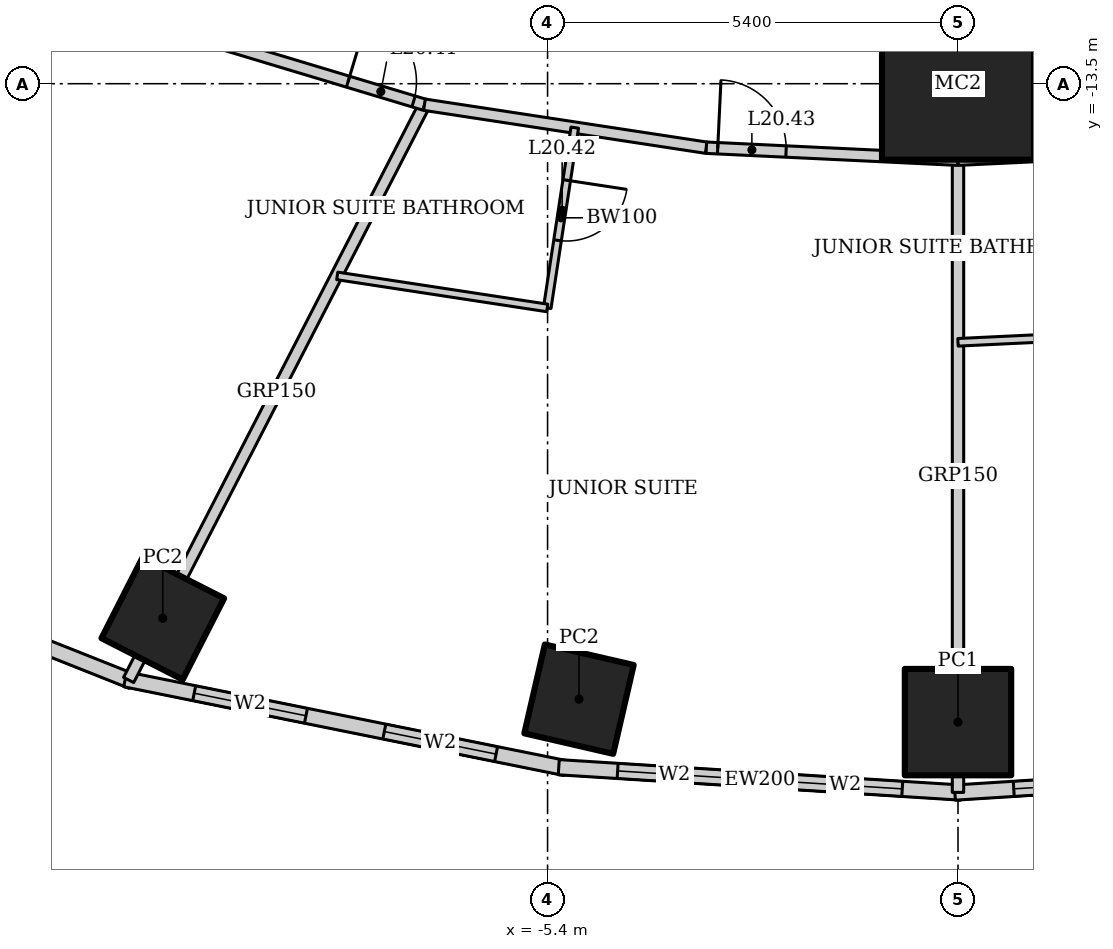
"""IFC4 building model, lengths in metres.
Left out: names, types, materials, properties, quantities, classifications, styles, units other than length and angle.
Written with IfcOpenShell. Run it as: python <this file> out.ifc"""

import sys

from ifc_helpers import new_model, si_unit, direction, frame, frame_2d, origin, origin_2d, place, context, subcontext, project, spatial, rectangle, hollow_rectangle, extrude, element, fill, save


model = new_model("IFC4")
c1 = context("Model", 3, precision=1e-05, world=origin(), true_north=direction((0.0, 1.0)))
c2 = subcontext(c1, "Body", "Model", "MODEL_VIEW")
j1 = project(units=[si_unit("LENGTHUNIT", "METRE"), si_unit("PLANEANGLEUNIT", "RADIAN")], contexts=[c1])
p1 = place(None, origin())
s1 = spatial("IfcSite", under=j1, at=p1, CompositionType="ELEMENT")
p2 = place(p1, origin())
s2 = spatial("IfcBuilding", under=s1, at=p2, CompositionType="ELEMENT")
p3 = place(p2, frame((0.0, 0.0, 87.4)))
s3 = spatial("IfcBuildingStorey", under=s2, at=p3, CompositionType="ELEMENT", Elevation=87.4)
p4 = place(p3, frame((0.0, -13.5, 0.0), z_axis=(0.0, 0.0, 1.0), x_axis=(1.0, 0.0, 0.0)))
e1 = element("IfcColumn", 1, at=p4, inside=s3, PredefinedType="COLUMN", context=c2, shape_type="SweptSolid", body=[
    extrude(hollow_rectangle(XDim=2.0, YDim=2.0, WallThickness=0.17, at=origin_2d()), origin(), (0.0, 0.0, 1.0), 3.6),
])
for number, where, z_axis, x_axis in (
    (2, (-10.463, -20.534, 0.0), (0.0, 0.0, 1.0), (0.454, 0.891, 0.0)),
    (3, (-4.986, -21.598, 0.0), (0.0, 0.0, 1.0), (0.225, 0.974, 0.0)),
):
    element("IfcColumn", number, at=place(p3, frame(where, z_axis=z_axis, x_axis=x_axis)), inside=s3, PredefinedType="COLUMN", context=c2, shape_type="SweptSolid", body=[
        extrude(hollow_rectangle(XDim=1.2, YDim=1.2, WallThickness=0.1, at=origin_2d()), origin(), (0.0, 0.0, 1.0), 3.6),
    ])
p5 = place(p3, frame((0.0, -21.9, 0.0), z_axis=(0.0, 0.0, 1.0), x_axis=(1.0, 0.0, 0.0)))
e4 = element("IfcColumn", 4, at=p5, inside=s3, PredefinedType="COLUMN", context=c2, shape_type="SweptSolid", body=[
    extrude(hollow_rectangle(XDim=1.4, YDim=1.4, WallThickness=0.1, at=origin_2d()), origin(), (0.0, 0.0, 1.0), 3.6),
])
p6 = place(p3, frame((-18.018, -18.523, 0.0), z_axis=(0.0, 0.0, 1.0), x_axis=(0.929358351251, -0.369178892895, 0.0)))
e5 = element("IfcWall", 5, at=p6, inside=s3, PredefinedType="SOLIDWALL", context=c2, shape_type="SweptSolid", body=[
    extrude(rectangle(XDim=7.692, YDim=0.2, at=frame_2d((3.846, 0.0))), origin(), (0.0, 0.0, 1.0), 3.45),
])
p7 = place(p6, frame((1.373, 0.0, 0.5)))
e6 = element("IfcOpeningElement", 6, at=p7, cuts=e5, PredefinedType="OPENING", context=c2, shape_type="SweptSolid", body=[
    extrude(rectangle(XDim=1.5, YDim=2.2, at=frame_2d((0.75, 1.1))), frame((0.0, 0.11, 0.0), z_axis=(0.0, -1.0, 0.0), x_axis=(1.0, 0.0, 0.0)), (0.0, 0.0, 1.0), 0.22),
])
p8 = place(p6, frame((4.819, 0.0, 0.5)))
e7 = element("IfcOpeningElement", 7, at=p8, cuts=e5, PredefinedType="OPENING", context=c2, shape_type="SweptSolid", body=[
    extrude(rectangle(XDim=1.5, YDim=2.2, at=frame_2d((0.75, 1.1))), frame((0.0, 0.11, 0.0), z_axis=(0.0, -1.0, 0.0), x_axis=(1.0, 0.0, 0.0)), (0.0, 0.0, 1.0), 0.22),
])
p9 = place(p3, frame((-10.957, -21.337, 0.0), z_axis=(0.0, 0.0, 1.0), x_axis=(0.980251657452, -0.197754110105, 0.0)))
e8 = element("IfcWall", 8, at=p9, inside=s3, PredefinedType="SOLIDWALL", context=c2, shape_type="SweptSolid", body=[
    extrude(rectangle(XDim=5.904, YDim=0.2, at=frame_2d((2.952, 0.0))), origin(), (0.0, 0.0, 1.0), 3.45),
])
p10 = place(p9, frame((0.926, 0.0, 0.5)))
e9 = element("IfcOpeningElement", 9, at=p10, cuts=e8, PredefinedType="OPENING", context=c2, shape_type="SweptSolid", body=[
    extrude(rectangle(XDim=1.5, YDim=2.2, at=frame_2d((0.75, 1.1))), frame((0.0, 0.11, 0.0), z_axis=(0.0, -1.0, 0.0), x_axis=(1.0, 0.0, 0.0)), (0.0, 0.0, 1.0), 0.22),
])
p11 = place(p9, frame((3.478, 0.0, 0.5)))
e10 = element("IfcOpeningElement", 10, at=p11, cuts=e8, PredefinedType="OPENING", context=c2, shape_type="SweptSolid", body=[
    extrude(rectangle(XDim=1.5, YDim=2.2, at=frame_2d((0.75, 1.1))), frame((0.0, 0.11, 0.0), z_axis=(0.0, -1.0, 0.0), x_axis=(1.0, 0.0, 0.0)), (0.0, 0.0, 1.0), 0.22),
])
p12 = place(p3, frame((-5.253, -22.493, 0.0), z_axis=(0.0, 0.0, 1.0), x_axis=(0.998018582375, -0.062919863585, 0.0)))
e11 = element("IfcWall", 11, at=p12, inside=s3, PredefinedType="SOLIDWALL", context=c2, shape_type="SweptSolid", body=[
    extrude(rectangle(XDim=5.304, YDim=0.2, at=frame_2d((2.652, 0.0))), origin(), (0.0, 0.0, 1.0), 3.45),
])
p13 = place(p12, frame((0.776, 0.0, 0.5)))
e12 = element("IfcOpeningElement", 12, at=p13, cuts=e11, PredefinedType="OPENING", context=c2, shape_type="SweptSolid", body=[
    extrude(rectangle(XDim=1.5, YDim=2.2, at=frame_2d((0.75, 1.1))), frame((0.0, 0.11, 0.0), z_axis=(0.0, -1.0, 0.0), x_axis=(1.0, 0.0, 0.0)), (0.0, 0.0, 1.0), 0.22),
])
p14 = place(p12, frame((3.028, 0.0, 0.5)))
e13 = element("IfcOpeningElement", 13, at=p14, cuts=e11, PredefinedType="OPENING", context=c2, shape_type="SweptSolid", body=[
    extrude(rectangle(XDim=1.5, YDim=2.2, at=frame_2d((0.75, 1.1))), frame((0.0, 0.11, 0.0), z_axis=(0.0, -1.0, 0.0), x_axis=(1.0, 0.0, 0.0)), (0.0, 0.0, 1.0), 0.22),
])
p15 = place(p3, frame((-0.041, -22.827, 0.0), z_axis=(0.0, 0.0, 1.0), x_axis=(0.998018582375, 0.062919863585, 0.0)))
e14 = element("IfcWall", 14, at=p15, inside=s3, PredefinedType="SOLIDWALL", context=c2, shape_type="SweptSolid", body=[
    extrude(rectangle(XDim=5.304, YDim=0.2, at=frame_2d((2.652, 0.0))), origin(), (0.0, 0.0, 1.0), 3.45),
])
p16 = place(p15, frame((0.776, 0.0, 0.5)))
e15 = element("IfcOpeningElement", 15, at=p16, cuts=e14, PredefinedType="OPENING", context=c2, shape_type="SweptSolid", body=[
    extrude(rectangle(XDim=1.5, YDim=2.2, at=frame_2d((0.75, 1.1))), frame((0.0, 0.11, 0.0), z_axis=(0.0, -1.0, 0.0), x_axis=(1.0, 0.0, 0.0)), (0.0, 0.0, 1.0), 0.22),
])
p17 = place(p15, frame((3.028, 0.0, 0.5)))
e16 = element("IfcOpeningElement", 16, at=p17, cuts=e14, PredefinedType="OPENING", context=c2, shape_type="SweptSolid", body=[
    extrude(rectangle(XDim=1.5, YDim=2.2, at=frame_2d((0.75, 1.1))), frame((0.0, 0.11, 0.0), z_axis=(0.0, -1.0, 0.0), x_axis=(1.0, 0.0, 0.0)), (0.0, 0.0, 1.0), 0.22),
])
p18 = place(p3, frame((-10.912, -21.346, 0.0), z_axis=(0.0, 0.0, 1.0), x_axis=(0.457327273085, 0.889298468059, 0.0)))
e17 = element("IfcWall", 17, at=p18, inside=s3, PredefinedType="PARTITIONING", context=c2, shape_type="SweptSolid", body=[
    extrude(rectangle(XDim=8.511, YDim=0.15, at=frame_2d((4.256, 0.0))), origin(), (0.0, 0.0, 1.0), 2.528),
])
p19 = place(p3, frame((0.0, -22.825, 0.0), z_axis=(0.0, 0.0, 1.0), x_axis=(0.0, 1.0, 0.0)))
e18 = element("IfcWall", 18, at=p19, inside=s3, PredefinedType="PARTITIONING", context=c2, shape_type="SweptSolid", body=[
    extrude(rectangle(XDim=8.325, YDim=0.15, at=frame_2d((4.162, 0.0))), origin(), (0.0, 0.0, 1.0), 2.924),
])
p20 = place(p3, frame((-11.888, -12.311, 0.0), z_axis=(0.0, 0.0, 1.0), x_axis=(0.957564241242, -0.288219922793, 0.0)))
e19 = element("IfcWall", 19, at=p20, inside=s3, PredefinedType="PARTITIONING", context=c2, shape_type="SweptSolid", body=[
    extrude(rectangle(XDim=5.085, YDim=0.15, at=frame_2d((2.542, 0.0))), origin(), (0.0, 0.0, 1.0), 3.45),
])
p21 = place(p20, frame((4.035, 0.0, 0.0)))
e20 = element("IfcOpeningElement", 20, at=p21, cuts=e19, PredefinedType="OPENING", context=c2, shape_type="SweptSolid", body=[
    extrude(rectangle(XDim=0.9, YDim=2.1, at=frame_2d((0.45, 1.05))), frame((0.0, 0.085, 0.0), z_axis=(0.0, -1.0, 0.0), x_axis=(1.0, 0.0, 0.0)), (0.0, 0.0, 1.0), 0.17),
])
p22 = place(p3, frame((-7.019, -13.776, 0.0), z_axis=(0.0, 0.0, 1.0), x_axis=(0.988564270062, -0.150800145746, 0.0)))
e21 = element("IfcWall", 21, at=p22, inside=s3, PredefinedType="PARTITIONING", context=c2, shape_type="SweptSolid", body=[
    extrude(rectangle(XDim=3.751, YDim=0.15, at=frame_2d((1.875, 0.0))), origin(), (0.0, 0.0, 1.0), 3.45),
])
p23 = place(p3, frame((-3.311, -14.342, 0.0), z_axis=(0.0, 0.0, 1.0), x_axis=(0.998863968075, -0.047652631422, 0.0)))
e22 = element("IfcWall", 22, at=p23, inside=s3, PredefinedType="PARTITIONING", context=c2, shape_type="SweptSolid", body=[
    extrude(rectangle(XDim=3.315, YDim=0.15, at=frame_2d((1.657, 0.0))), origin(), (0.0, 0.0, 1.0), 3.45),
])
p24 = place(p23, frame((0.15, 0.0, 0.0)))
e23 = element("IfcOpeningElement", 23, at=p24, cuts=e22, PredefinedType="OPENING", context=c2, shape_type="SweptSolid", body=[
    extrude(rectangle(XDim=0.9, YDim=2.1, at=frame_2d((0.45, 1.05))), frame((0.0, 0.085, 0.0), z_axis=(0.0, -1.0, 0.0), x_axis=(1.0, 0.0, 0.0)), (0.0, 0.0, 1.0), 0.17),
])
p25 = place(p3, frame((0.0, -14.5, 0.0), z_axis=(0.0, 0.0, 1.0), x_axis=(0.998863968075, 0.047652631422, 0.0)))
e24 = element("IfcWall", 24, at=p25, inside=s3, PredefinedType="PARTITIONING", context=c2, shape_type="SweptSolid", body=[
    extrude(rectangle(XDim=3.315, YDim=0.15, at=frame_2d((1.657, 0.0))), origin(), (0.0, 0.0, 1.0), 3.45),
])
p26 = place(p3, frame((-5.042, -14.078, 0.0), z_axis=(0.0, 0.0, 1.0), x_axis=(-0.150856962013, -0.988555601376, 0.0)))
e25 = element("IfcWall", 25, at=p26, inside=s3, PredefinedType="PARTITIONING", context=c2, shape_type="SweptSolid", body=[
    extrude(rectangle(XDim=2.4, YDim=0.1, at=frame_2d((1.2, 0.0))), origin(), (0.0, 0.0, 1.0), 3.45),
])
p27 = place(p26, frame((0.7, 0.0, 0.0)))
e26 = element("IfcOpeningElement", 26, at=p27, cuts=e25, PredefinedType="OPENING", context=c2, shape_type="SweptSolid", body=[
    extrude(rectangle(XDim=0.8, YDim=2.1, at=frame_2d((0.4, 1.05))), frame((0.0, 0.06, 0.0), z_axis=(0.0, -1.0, 0.0), x_axis=(1.0, 0.0, 0.0)), (0.0, 0.0, 1.0), 0.12),
])
p28 = place(p3, frame((-5.404, -16.45, 0.0), z_axis=(0.0, 0.0, 1.0), x_axis=(-0.988568792086, 0.150770498819, 0.0)))
e27 = element("IfcWall", 27, at=p28, inside=s3, PredefinedType="PARTITIONING", context=c2, shape_type="SweptSolid", body=[
    extrude(rectangle(XDim=2.795, YDim=0.1, at=frame_2d((1.397, 0.0))), origin(), (0.0, 0.0, 1.0), 3.45),
])
p29 = place(p3, frame((2.112, -16.802, 0.0), z_axis=(0.0, 0.0, 1.0), x_axis=(-0.998862383453, -0.047685835668, 0.0)))
e28 = element("IfcWall", 28, at=p29, inside=s3, PredefinedType="PARTITIONING", context=c2, shape_type="SweptSolid", body=[
    extrude(rectangle(XDim=2.115, YDim=0.1, at=frame_2d((1.057, 0.0))), origin(), (0.0, 0.0, 1.0), 3.45),
])
p30 = place(p10, origin())
e29 = element("IfcWindow", 29, at=p30, inside=s3, PartitioningType="SINGLE_PANEL", PredefinedType="WINDOW", context=c2, shape_type="SweptSolid", body=[
    extrude(rectangle(XDim=1.5, YDim=2.2, at=frame_2d((0.75, 1.1))), frame((0.0, 0.03, 0.0), z_axis=(0.0, -1.0, 0.0), x_axis=(1.0, 0.0, 0.0)), (0.0, 0.0, 1.0), 0.06),
])
fill(e9, e29)
p31 = place(p11, origin())
e30 = element("IfcWindow", 30, at=p31, inside=s3, PartitioningType="SINGLE_PANEL", PredefinedType="WINDOW", context=c2, shape_type="SweptSolid", body=[
    extrude(rectangle(XDim=1.5, YDim=2.2, at=frame_2d((0.75, 1.1))), frame((0.0, 0.03, 0.0), z_axis=(0.0, -1.0, 0.0), x_axis=(1.0, 0.0, 0.0)), (0.0, 0.0, 1.0), 0.06),
])
fill(e10, e30)
p32 = place(p13, origin())
e31 = element("IfcWindow", 31, at=p32, inside=s3, PartitioningType="SINGLE_PANEL", PredefinedType="WINDOW", context=c2, shape_type="SweptSolid", body=[
    extrude(rectangle(XDim=1.5, YDim=2.2, at=frame_2d((0.75, 1.1))), frame((0.0, 0.03, 0.0), z_axis=(0.0, -1.0, 0.0), x_axis=(1.0, 0.0, 0.0)), (0.0, 0.0, 1.0), 0.06),
])
fill(e12, e31)
p33 = place(p14, origin())
e32 = element("IfcWindow", 32, at=p33, inside=s3, PartitioningType="SINGLE_PANEL", PredefinedType="WINDOW", context=c2, shape_type="SweptSolid", body=[
    extrude(rectangle(XDim=1.5, YDim=2.2, at=frame_2d((0.75, 1.1))), frame((0.0, 0.03, 0.0), z_axis=(0.0, -1.0, 0.0), x_axis=(1.0, 0.0, 0.0)), (0.0, 0.0, 1.0), 0.06),
])
fill(e13, e32)
p34 = place(p16, origin())
e33 = element("IfcWindow", 33, at=p34, inside=s3, PartitioningType="SINGLE_PANEL", PredefinedType="WINDOW", context=c2, shape_type="SweptSolid", body=[
    extrude(rectangle(XDim=1.5, YDim=2.2, at=frame_2d((0.75, 1.1))), frame((0.0, 0.03, 0.0), z_axis=(0.0, -1.0, 0.0), x_axis=(1.0, 0.0, 0.0)), (0.0, 0.0, 1.0), 0.06),
])
fill(e15, e33)
p35 = place(p21, origin())
e34 = element("IfcDoor", 34, at=p35, inside=s3, OperationType="SINGLE_SWING_LEFT", PredefinedType="DOOR", context=c2, shape_type="SweptSolid", body=[
    extrude(rectangle(XDim=0.9, YDim=2.1, at=frame_2d((0.45, 1.05))), frame((0.0, 0.025, 0.0), z_axis=(0.0, -1.0, 0.0), x_axis=(1.0, 0.0, 0.0)), (0.0, 0.0, 1.0), 0.05),
])
fill(e20, e34)
p36 = place(p27, origin())
e35 = element("IfcDoor", 35, at=p36, inside=s3, OperationType="SINGLE_SWING_LEFT", PredefinedType="DOOR", context=c2, shape_type="SweptSolid", body=[
    extrude(rectangle(XDim=0.8, YDim=2.1, at=frame_2d((0.4, 1.05))), frame((0.0, 0.025, 0.0), z_axis=(0.0, -1.0, 0.0), x_axis=(1.0, 0.0, 0.0)), (0.0, 0.0, 1.0), 0.05),
])
fill(e26, e35)
p37 = place(p24, origin())
e36 = element("IfcDoor", 36, at=p37, inside=s3, OperationType="SINGLE_SWING_LEFT", PredefinedType="DOOR", context=c2, shape_type="SweptSolid", body=[
    extrude(rectangle(XDim=0.9, YDim=2.1, at=frame_2d((0.45, 1.05))), frame((0.0, 0.025, 0.0), z_axis=(0.0, -1.0, 0.0), x_axis=(1.0, 0.0, 0.0)), (0.0, 0.0, 1.0), 0.05),
])
fill(e23, e36)
save(model, sys.argv[1])
